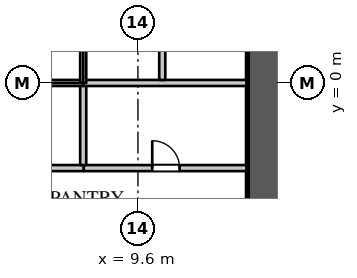
"""IFC4 building model, lengths in metres.
Left out: names, types, materials, properties, quantities, classifications, styles, units other than length and angle.
Written with IfcOpenShell. Run it as: python <this file> out.ifc"""

import sys

from ifc_helpers import new_model, si_unit, direction, frame, frame_2d, origin, place, context, subcontext, project, spatial, rectangle, extrude, element, fill, save


model = new_model("IFC4")
c1 = context("Model", 3, precision=1e-05, world=origin(), true_north=direction((0.0, 1.0)))
c2 = subcontext(c1, "Body", "Model", "MODEL_VIEW")
j1 = project(units=[si_unit("LENGTHUNIT", "METRE"), si_unit("PLANEANGLEUNIT", "RADIAN")], contexts=[c1])
p1 = place(None, origin())
s1 = spatial("IfcSite", under=j1, at=p1, CompositionType="ELEMENT")
p2 = place(p1, origin())
s2 = spatial("IfcBuilding", under=s1, at=p2, CompositionType="ELEMENT")
p3 = place(p2, frame((0.0, 0.0, -4.5)))
s3 = spatial("IfcBuildingStorey", under=s2, at=p3, CompositionType="ELEMENT", Elevation=-4.5)
p4 = place(p3, frame((13.8, -10.8, 0.0), z_axis=(0.0, 0.0, 1.0), x_axis=(0.0, 1.0, 0.0)))
e1 = element("IfcWall", 1, at=p4, inside=s3, PredefinedType="SHEAR", context=c2, shape_type="SweptSolid", body=[
    extrude(rectangle(XDim=21.6, YDim=1.2, at=frame_2d((10.8, 0.0))), origin(), (0.0, 0.0, 1.0), 4.5),
])
p5 = place(p4, frame((14.35, 0.0, 0.0)))
e2 = element("IfcOpeningElement", 2, at=p5, cuts=e1, PredefinedType="OPENING", context=c2, shape_type="SweptSolid", body=[
    extrude(rectangle(XDim=1.5, YDim=2.4, at=frame_2d((0.75, 1.2))), frame((0.0, 0.61, 0.0), z_axis=(0.0, -1.0, 0.0), x_axis=(1.0, 0.0, 0.0)), (0.0, 0.0, 1.0), 1.22),
])
p6 = place(p3, frame((-2.62, -2.8, 0.0), z_axis=(0.0, 0.0, 1.0), x_axis=(1.0, 0.0, 0.0)))
e3 = element("IfcWall", 3, at=p6, inside=s3, PredefinedType="PARTITIONING", context=c2, shape_type="SweptSolid", body=[
    extrude(rectangle(XDim=10.44, YDim=0.2, at=frame_2d((5.22, 0.0))), origin(), (0.0, 0.0, 1.0), 4.048),
])
p7 = place(p6, frame((2.25, 0.0, 0.0)))
e4 = element("IfcOpeningElement", 4, at=p7, cuts=e3, PredefinedType="OPENING", context=c2, shape_type="SweptSolid", body=[
    extrude(rectangle(XDim=0.9, YDim=2.2, at=frame_2d((0.45, 1.1))), frame((0.0, 0.11, 0.0), z_axis=(0.0, -1.0, 0.0), x_axis=(1.0, 0.0, 0.0)), (0.0, 0.0, 1.0), 0.22),
])
p8 = place(p6, frame((7.3, 0.0, 0.0)))
e5 = element("IfcOpeningElement", 5, at=p8, cuts=e3, PredefinedType="OPENING", context=c2, shape_type="SweptSolid", body=[
    extrude(rectangle(XDim=0.9, YDim=2.2, at=frame_2d((0.45, 1.1))), frame((0.0, 0.11, 0.0), z_axis=(0.0, -1.0, 0.0), x_axis=(1.0, 0.0, 0.0)), (0.0, 0.0, 1.0), 0.22),
])
p9 = place(p3, frame((7.82, -2.8, 0.0), z_axis=(0.0, 0.0, 1.0), x_axis=(1.0, 0.0, 0.0)))
e6 = element("IfcWall", 6, at=p9, inside=s3, PredefinedType="PARTITIONING", context=c2, shape_type="SweptSolid", body=[
    extrude(rectangle(XDim=5.35, YDim=0.2, at=frame_2d((2.675, 0.0))), origin(), (0.0, 0.0, 1.0), 4.048),
])
p10 = place(p9, frame((2.25, 0.0, 0.0)))
e7 = element("IfcOpeningElement", 7, at=p10, cuts=e6, PredefinedType="OPENING", context=c2, shape_type="SweptSolid", body=[
    extrude(rectangle(XDim=0.9, YDim=2.2, at=frame_2d((0.45, 1.1))), frame((0.0, 0.11, 0.0), z_axis=(0.0, -1.0, 0.0), x_axis=(1.0, 0.0, 0.0)), (0.0, 0.0, 1.0), 0.22),
])
p11 = place(p3, frame((7.8, -2.7, 0.0), z_axis=(0.0, 0.0, 1.0), x_axis=(0.0, 1.0, 0.0)))
e8 = element("IfcWall", 8, at=p11, inside=s3, PredefinedType="PARTITIONING", context=c2, shape_type="SweptSolid", body=[
    extrude(rectangle(XDim=2.7, YDim=0.2, at=frame_2d((1.35, 0.0))), origin(), (0.0, 0.0, 1.0), 4.048),
])
p12 = place(p3, frame((7.8, 0.0, 0.0), z_axis=(0.0, 0.0, 1.0), x_axis=(1.0, 0.0, 0.0)))
e9 = element("IfcWall", 9, at=p12, inside=s3, PredefinedType="PARTITIONING", context=c2, shape_type="SweptSolid", body=[
    extrude(rectangle(XDim=5.37, YDim=0.2, at=frame_2d((2.685, 0.0))), origin(), (0.0, 0.0, 1.0), 4.048),
])
p13 = place(p3, frame((10.4, 0.1, 0.0), z_axis=(0.0, 0.0, 1.0), x_axis=(0.0, 1.0, 0.0)))
e10 = element("IfcWall", 10, at=p13, inside=s3, PredefinedType="PARTITIONING", context=c2, shape_type="SweptSolid", body=[
    extrude(rectangle(XDim=2.6, YDim=0.2, at=frame_2d((1.3, 0.0))), origin(), (0.0, 0.0, 1.0), 4.048),
])
p14 = place(p3, frame((-13.17, 0.0, 0.0), z_axis=(0.0, 0.0, 1.0), x_axis=(1.0, 0.0, 0.0)))
e11 = element("IfcWall", 11, at=p14, inside=s3, PredefinedType="PARTITIONING", context=c2, shape_type="SweptSolid", body=[
    extrude(rectangle(XDim=20.97, YDim=0.2, at=frame_2d((10.485, 0.0))), origin(), (0.0, 0.0, 1.0), 4.048),
])
p15 = place(p3, frame((7.8, 0.0, 0.0), z_axis=(0.0, 0.0, 1.0), x_axis=(0.0, 1.0, 0.0)))
e12 = element("IfcWall", 12, at=p15, inside=s3, PredefinedType="PARTITIONING", context=c2, shape_type="SweptSolid", body=[
    extrude(rectangle(XDim=2.7, YDim=0.2, at=frame_2d((1.35, 0.0))), origin(), (0.0, 0.0, 1.0), 4.048),
])
p16 = place(p10, origin())
e13 = element("IfcDoor", 13, at=p16, inside=s3, OperationType="SINGLE_SWING_LEFT", PredefinedType="DOOR", context=c2, shape_type="SweptSolid", body=[
    extrude(rectangle(XDim=0.9, YDim=2.2, at=frame_2d((0.45, 1.1))), frame((0.0, 0.025, 0.0), z_axis=(0.0, -1.0, 0.0), x_axis=(1.0, 0.0, 0.0)), (0.0, 0.0, 1.0), 0.05),
])
fill(e7, e13)
save(model, sys.argv[1])
